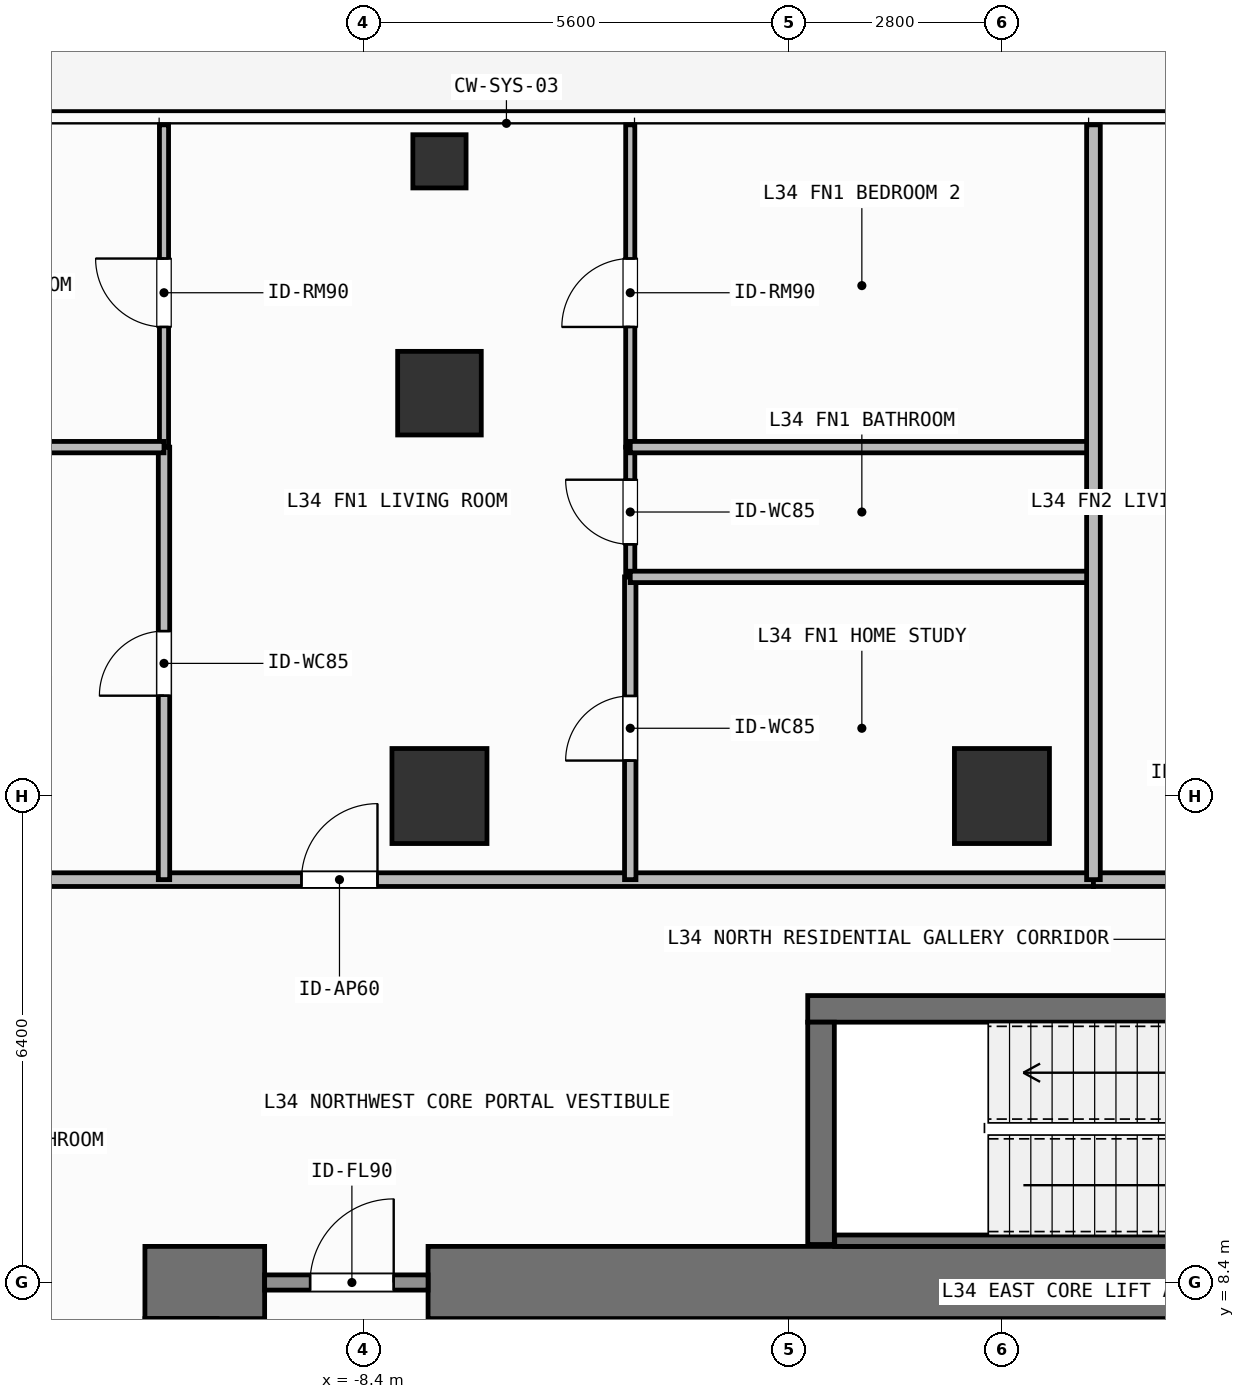
"""IFC4 building model, lengths in metres.
Left out: names, types, materials, properties, quantities, classifications, styles, units other than length and angle.
Written with IfcOpenShell. Run it as: python <this file> out.ifc"""

import sys

from ifc_helpers import new_model, si_unit, direction, frame, frame_2d, origin, origin_2d, place, context, subcontext, project, spatial, rectangle, hollow_rectangle, extrude, element, fill, save


model = new_model("IFC4")
c1 = context("Model", 3, precision=1e-05, world=origin(), true_north=direction((0.0, 1.0)))
c2 = subcontext(c1, "Body", "Model", "MODEL_VIEW")
j1 = project(units=[si_unit("LENGTHUNIT", "METRE"), si_unit("PLANEANGLEUNIT", "RADIAN")], contexts=[c1])
p1 = place(None, origin())
s1 = spatial("IfcSite", under=j1, at=p1, CompositionType="ELEMENT")
p2 = place(p1, origin())
s2 = spatial("IfcBuilding", under=s1, at=p2, CompositionType="ELEMENT")
p3 = place(p2, frame((0.0, 0.0, 136.8)))
s3 = spatial("IfcBuildingStorey", under=s2, at=p3, CompositionType="ELEMENT", Elevation=136.8)
p4 = place(p3, frame((-11.275, 8.4, 0.0), z_axis=(0.0, 0.0, 1.0), x_axis=(1.0, 0.0, 0.0)))
e1 = element("IfcWall", 1, at=p4, inside=s3, PredefinedType="SHEAR", context=c2, shape_type="SweptSolid", body=[
    extrude(rectangle(XDim=1.575, YDim=0.95, at=frame_2d((0.788, 0.0))), origin(), (0.0, 0.0, 1.0), 3.9),
])
p5 = place(p3, frame((-7.55, 8.4, 0.0), z_axis=(0.0, 0.0, 1.0), x_axis=(1.0, 0.0, 0.0)))
e2 = element("IfcWall", 2, at=p5, inside=s3, PredefinedType="SHEAR", context=c2, shape_type="SweptSolid", body=[
    extrude(rectangle(XDim=16.425, YDim=0.95, at=frame_2d((8.212, 0.0))), origin(), (0.0, 0.0, 1.0), 3.9),
])
p6 = place(p3, frame((-10.8, -7.925, 0.0), z_axis=(0.0, 0.0, 1.0), x_axis=(0.0, 1.0, 0.0)))
e3 = element("IfcWall", 3, at=p6, inside=s3, PredefinedType="SHEAR", context=c2, shape_type="SweptSolid", body=[
    extrude(rectangle(XDim=15.85, YDim=0.95, at=frame_2d((7.925, 0.0))), origin(), (0.0, 0.0, 1.0), 3.9),
])
p7 = place(p3, frame((-2.555, 12.0, 0.0), z_axis=(0.0, 0.0, 1.0), x_axis=(1.0, 0.0, 0.0)))
e4 = element("IfcWall", 4, at=p7, inside=s3, PredefinedType="SHEAR", context=c2, shape_type="SweptSolid", body=[
    extrude(rectangle(XDim=7.31, YDim=0.35, at=frame_2d((3.655, 0.0))), origin(), (0.0, 0.0, 1.0), 3.9),
])
p8 = place(p3, frame((-2.2, 8.95, 0.0), z_axis=(0.0, 0.0, 1.0), x_axis=(1.0, 0.0, 0.0)))
e5 = element("IfcWall", 5, at=p8, inside=s3, PredefinedType="SHEAR", context=c2, shape_type="SweptSolid", body=[
    extrude(rectangle(XDim=6.6, YDim=0.15, at=frame_2d((3.3, 0.0))), origin(), (0.0, 0.0, 1.0), 3.9),
])
p9 = place(p3, frame((-2.38, 8.9, 0.0), z_axis=(0.0, 0.0, 1.0), x_axis=(0.0, 1.0, 0.0)))
e6 = element("IfcWall", 6, at=p9, inside=s3, PredefinedType="SHEAR", context=c2, shape_type="SweptSolid", body=[
    extrude(rectangle(XDim=2.925, YDim=0.35, at=frame_2d((1.462, 0.0))), origin(), (0.0, 0.0, 1.0), 3.9),
])
for number, where, z_axis, x_axis in (
    (7, (-7.4, 14.8, 0.0), (0.0, 0.0, 1.0), (1.0, 0.0, 0.0)),
    (8, (0.0, 14.8, 0.0), (0.0, 0.0, 1.0), (1.0, 0.0, 0.0)),
):
    element("IfcColumn", number, at=place(p3, frame(where, z_axis=z_axis, x_axis=x_axis)), inside=s3, PredefinedType="COLUMN", context=c2, shape_type="SweptSolid", body=[
        extrude(rectangle(XDim=1.25, YDim=1.25, at=origin_2d()), origin(), (0.0, 0.0, 1.0), 3.9),
    ])
p10 = place(p3, frame((-7.4, 20.1, 0.0), z_axis=(0.0, 0.0, 1.0), x_axis=(1.0, 0.0, 0.0)))
e9 = element("IfcColumn", 9, at=p10, inside=s3, PredefinedType="COLUMN", context=c2, shape_type="SweptSolid", body=[
    extrude(rectangle(XDim=1.1, YDim=1.1, at=origin_2d()), origin(), (0.0, 0.0, 1.0), 3.9),
])
p11 = place(p3, frame((-7.4, 23.15, 0.0), z_axis=(0.0, 0.0, 1.0), x_axis=(1.0, 0.0, 0.0)))
e10 = element("IfcColumn", 10, at=p11, inside=s3, PredefinedType="COLUMN", context=c2, shape_type="SweptSolid", body=[
    extrude(hollow_rectangle(XDim=0.7, YDim=0.7, WallThickness=0.032, at=origin_2d()), origin(), (0.0, 0.0, 1.0), 3.9),
])
p12 = place(p3, frame((-9.7, 8.4, 0.0), z_axis=(0.0, 0.0, 1.0), x_axis=(1.0, 0.0, 0.0)))
e11 = element("IfcWall", 11, at=p12, inside=s3, PredefinedType="SOLIDWALL", context=c2, shape_type="SweptSolid", body=[
    extrude(rectangle(XDim=2.15, YDim=0.2, at=frame_2d((1.075, 0.0))), origin(), (0.0, 0.0, 1.0), 2.72),
])
p13 = place(p12, frame((0.598, 0.0, 0.0)))
e12 = element("IfcOpeningElement", 12, at=p13, cuts=e11, PredefinedType="OPENING", context=c2, shape_type="SweptSolid", body=[
    extrude(rectangle(XDim=1.1, YDim=2.15, at=frame_2d((0.55, 1.075))), frame((0.0, 0.11, 0.0), z_axis=(0.0, -1.0, 0.0), x_axis=(1.0, 0.0, 0.0)), (0.0, 0.0, 1.0), 0.22),
])
p14 = place(p3, frame((-16.32, 13.7, 0.0), z_axis=(0.0, 0.0, 1.0), x_axis=(1.0, 0.0, 0.0)))
e13 = element("IfcWall", 13, at=p14, inside=s3, PredefinedType="PARTITIONING", context=c2, shape_type="SweptSolid", body=[
    extrude(rectangle(XDim=17.524, YDim=0.18, at=frame_2d((8.762, 0.0))), origin(), (0.0, 0.0, 1.0), 3.68),
])
p15 = place(p14, frame((7.104, 0.0, 0.0)))
e14 = element("IfcOpeningElement", 14, at=p15, cuts=e13, PredefinedType="OPENING", context=c2, shape_type="SweptSolid", body=[
    extrude(rectangle(XDim=1.0, YDim=2.2, at=frame_2d((0.5, 1.1))), frame((0.0, 0.1, 0.0), z_axis=(0.0, -1.0, 0.0), x_axis=(1.0, 0.0, 0.0)), (0.0, 0.0, 1.0), 0.2),
])
p16 = place(p3, frame((-11.024, 13.7, 0.0), z_axis=(0.0, 0.0, 1.0), x_axis=(0.0, 1.0, 0.0)))
e15 = element("IfcWall", 15, at=p16, inside=s3, PredefinedType="PARTITIONING", context=c2, shape_type="SweptSolid", body=[
    extrude(rectangle(XDim=5.69, YDim=0.15, at=frame_2d((2.845, 0.0))), origin(), (0.0, 0.0, 1.0), 3.68),
])
p17 = place(p16, frame((2.42, 0.0, 0.0)))
e16 = element("IfcOpeningElement", 16, at=p17, cuts=e15, PredefinedType="OPENING", context=c2, shape_type="SweptSolid", body=[
    extrude(rectangle(XDim=0.85, YDim=2.1, at=frame_2d((0.425, 1.05))), frame((0.0, 0.085, 0.0), z_axis=(0.0, -1.0, 0.0), x_axis=(1.0, 0.0, 0.0)), (0.0, 0.0, 1.0), 0.17),
])
p18 = place(p3, frame((-11.024, 19.39, 0.0), z_axis=(0.0, 0.0, 1.0), x_axis=(0.0, 1.0, 0.0)))
e17 = element("IfcWall", 17, at=p18, inside=s3, PredefinedType="PARTITIONING", context=c2, shape_type="SweptSolid", body=[
    extrude(rectangle(XDim=4.24, YDim=0.12, at=frame_2d((2.12, 0.0))), origin(), (0.0, 0.0, 1.0), 3.37),
])
p19 = place(p18, frame((1.581, 0.0, 0.0)))
e18 = element("IfcOpeningElement", 18, at=p19, cuts=e17, PredefinedType="OPENING", context=c2, shape_type="SweptSolid", body=[
    extrude(rectangle(XDim=0.9, YDim=2.1, at=frame_2d((0.45, 1.05))), frame((0.0, 0.07, 0.0), z_axis=(0.0, -1.0, 0.0), x_axis=(1.0, 0.0, 0.0)), (0.0, 0.0, 1.0), 0.14),
])
p20 = place(p3, frame((-4.89, 13.7, 0.0), z_axis=(0.0, 0.0, 1.0), x_axis=(0.0, 1.0, 0.0)))
e19 = element("IfcWall", 19, at=p20, inside=s3, PredefinedType="PARTITIONING", context=c2, shape_type="SweptSolid", body=[
    extrude(rectangle(XDim=3.983, YDim=0.15, at=frame_2d((1.992, 0.0))), origin(), (0.0, 0.0, 1.0), 3.68),
])
p21 = place(p20, frame((1.566, 0.0, 0.0)))
e20 = element("IfcOpeningElement", 20, at=p21, cuts=e19, PredefinedType="OPENING", context=c2, shape_type="SweptSolid", body=[
    extrude(rectangle(XDim=0.85, YDim=2.1, at=frame_2d((0.425, 1.05))), frame((0.0, 0.085, 0.0), z_axis=(0.0, -1.0, 0.0), x_axis=(1.0, 0.0, 0.0)), (0.0, 0.0, 1.0), 0.17),
])
p22 = place(p3, frame((-4.89, 17.683, 0.0), z_axis=(0.0, 0.0, 1.0), x_axis=(0.0, 1.0, 0.0)))
e21 = element("IfcWall", 21, at=p22, inside=s3, PredefinedType="PARTITIONING", context=c2, shape_type="SweptSolid", body=[
    extrude(rectangle(XDim=1.707, YDim=0.12, at=frame_2d((0.854, 0.0))), origin(), (0.0, 0.0, 1.0), 3.68),
])
p23 = place(p22, frame((0.428, 0.0, 0.0)))
e22 = element("IfcOpeningElement", 22, at=p23, cuts=e21, PredefinedType="OPENING", context=c2, shape_type="SweptSolid", body=[
    extrude(rectangle(XDim=0.85, YDim=2.1, at=frame_2d((0.425, 1.05))), frame((0.0, 0.07, 0.0), z_axis=(0.0, -1.0, 0.0), x_axis=(1.0, 0.0, 0.0)), (0.0, 0.0, 1.0), 0.14),
])
p24 = place(p3, frame((-4.89, 19.39, 0.0), z_axis=(0.0, 0.0, 1.0), x_axis=(0.0, 1.0, 0.0)))
e23 = element("IfcWall", 23, at=p24, inside=s3, PredefinedType="PARTITIONING", context=c2, shape_type="SweptSolid", body=[
    extrude(rectangle(XDim=4.24, YDim=0.12, at=frame_2d((2.12, 0.0))), origin(), (0.0, 0.0, 1.0), 3.68),
])
p25 = place(p24, frame((1.581, 0.0, 0.0)))
e24 = element("IfcOpeningElement", 24, at=p25, cuts=e23, PredefinedType="OPENING", context=c2, shape_type="SweptSolid", body=[
    extrude(rectangle(XDim=0.9, YDim=2.1, at=frame_2d((0.45, 1.05))), frame((0.0, 0.07, 0.0), z_axis=(0.0, -1.0, 0.0), x_axis=(1.0, 0.0, 0.0)), (0.0, 0.0, 1.0), 0.14),
])
p26 = place(p3, frame((1.204, 13.7, 0.0), z_axis=(0.0, 0.0, 1.0), x_axis=(1.0, 0.0, 0.0)))
e25 = element("IfcWall", 25, at=p26, inside=s3, PredefinedType="PARTITIONING", context=c2, shape_type="SweptSolid", body=[
    extrude(rectangle(XDim=7.616, YDim=0.18, at=frame_2d((3.808, 0.0))), origin(), (0.0, 0.0, 1.0), 3.68),
])
p27 = place(p26, frame((1.599, 0.0, 0.0)))
e26 = element("IfcOpeningElement", 26, at=p27, cuts=e25, PredefinedType="OPENING", context=c2, shape_type="SweptSolid", body=[
    extrude(rectangle(XDim=1.0, YDim=2.2, at=frame_2d((0.5, 1.1))), frame((0.0, 0.1, 0.0), z_axis=(0.0, -1.0, 0.0), x_axis=(1.0, 0.0, 0.0)), (0.0, 0.0, 1.0), 0.2),
])
p28 = place(p3, frame((-16.32, 19.39, 0.0), z_axis=(0.0, 0.0, 1.0), x_axis=(1.0, 0.0, 0.0)))
e27 = element("IfcWall", 27, at=p28, inside=s3, PredefinedType="PARTITIONING", context=c2, shape_type="SweptSolid", body=[
    extrude(rectangle(XDim=5.296, YDim=0.15, at=frame_2d((2.648, 0.0))), origin(), (0.0, 0.0, 1.0), 3.68),
])
for number, where, z_axis, x_axis in (
    (28, (-4.89, 17.683, 0.0), (0.0, 0.0, 1.0), (1.0, 0.0, 0.0)),
    (29, (-4.89, 19.39, 0.0), (0.0, 0.0, 1.0), (1.0, 0.0, 0.0)),
):
    element("IfcWall", number, at=place(p3, frame(where, z_axis=z_axis, x_axis=x_axis)), inside=s3, PredefinedType="PARTITIONING", context=c2, shape_type="SweptSolid", body=[
        extrude(rectangle(XDim=6.094, YDim=0.15, at=frame_2d((3.047, 0.0))), origin(), (0.0, 0.0, 1.0), 3.68),
    ])
p29 = place(p3, frame((1.204, 13.7, 0.0), z_axis=(0.0, 0.0, 1.0), x_axis=(0.0, 1.0, 0.0)))
e30 = element("IfcWall", 30, at=p29, inside=s3, PredefinedType="PARTITIONING", context=c2, shape_type="SweptSolid", body=[
    extrude(rectangle(XDim=9.93, YDim=0.18, at=frame_2d((4.965, 0.0))), origin(), (0.0, 0.0, 1.0), 3.68),
])
p30 = place(p13, origin())
e31 = element("IfcDoor", 31, at=p30, inside=s3, OperationType="SINGLE_SWING_RIGHT", PredefinedType="DOOR", context=c2, shape_type="SweptSolid", body=[
    extrude(rectangle(XDim=1.1, YDim=2.15, at=frame_2d((0.55, 1.075))), frame((0.0, 0.025, 0.0), z_axis=(0.0, -1.0, 0.0), x_axis=(1.0, 0.0, 0.0)), (0.0, 0.0, 1.0), 0.05),
])
fill(e12, e31)
p31 = place(p15, origin())
e32 = element("IfcDoor", 32, at=p31, inside=s3, OperationType="SINGLE_SWING_RIGHT", PredefinedType="DOOR", context=c2, shape_type="SweptSolid", body=[
    extrude(rectangle(XDim=1.0, YDim=2.2, at=frame_2d((0.5, 1.1))), frame((0.0, 0.025, 0.0), z_axis=(0.0, -1.0, 0.0), x_axis=(1.0, 0.0, 0.0)), (0.0, 0.0, 1.0), 0.05),
])
fill(e14, e32)
p32 = place(p17, origin())
e33 = element("IfcDoor", 33, at=p32, inside=s3, OperationType="SINGLE_SWING_LEFT", PredefinedType="DOOR", context=c2, shape_type="SweptSolid", body=[
    extrude(rectangle(XDim=0.85, YDim=2.1, at=frame_2d((0.425, 1.05))), frame((0.0, 0.025, 0.0), z_axis=(0.0, -1.0, 0.0), x_axis=(1.0, 0.0, 0.0)), (0.0, 0.0, 1.0), 0.05),
])
fill(e16, e33)
p33 = place(p19, origin())
e34 = element("IfcDoor", 34, at=p33, inside=s3, OperationType="SINGLE_SWING_RIGHT", PredefinedType="DOOR", context=c2, shape_type="SweptSolid", body=[
    extrude(rectangle(XDim=0.9, YDim=2.1, at=frame_2d((0.45, 1.05))), frame((0.0, 0.025, 0.0), z_axis=(0.0, -1.0, 0.0), x_axis=(1.0, 0.0, 0.0)), (0.0, 0.0, 1.0), 0.05),
])
fill(e18, e34)
p34 = place(p21, origin())
e35 = element("IfcDoor", 35, at=p34, inside=s3, OperationType="SINGLE_SWING_LEFT", PredefinedType="DOOR", context=c2, shape_type="SweptSolid", body=[
    extrude(rectangle(XDim=0.85, YDim=2.1, at=frame_2d((0.425, 1.05))), frame((0.0, 0.025, 0.0), z_axis=(0.0, -1.0, 0.0), x_axis=(1.0, 0.0, 0.0)), (0.0, 0.0, 1.0), 0.05),
])
fill(e20, e35)
p35 = place(p23, origin())
e36 = element("IfcDoor", 36, at=p35, inside=s3, OperationType="SINGLE_SWING_RIGHT", PredefinedType="DOOR", context=c2, shape_type="SweptSolid", body=[
    extrude(rectangle(XDim=0.85, YDim=2.1, at=frame_2d((0.425, 1.05))), frame((0.0, 0.025, 0.0), z_axis=(0.0, -1.0, 0.0), x_axis=(1.0, 0.0, 0.0)), (0.0, 0.0, 1.0), 0.05),
])
fill(e22, e36)
p36 = place(p25, origin())
e37 = element("IfcDoor", 37, at=p36, inside=s3, OperationType="SINGLE_SWING_LEFT", PredefinedType="DOOR", context=c2, shape_type="SweptSolid", body=[
    extrude(rectangle(XDim=0.9, YDim=2.1, at=frame_2d((0.45, 1.05))), frame((0.0, 0.025, 0.0), z_axis=(0.0, -1.0, 0.0), x_axis=(1.0, 0.0, 0.0)), (0.0, 0.0, 1.0), 0.05),
])
fill(e24, e37)
save(model, sys.argv[1])
